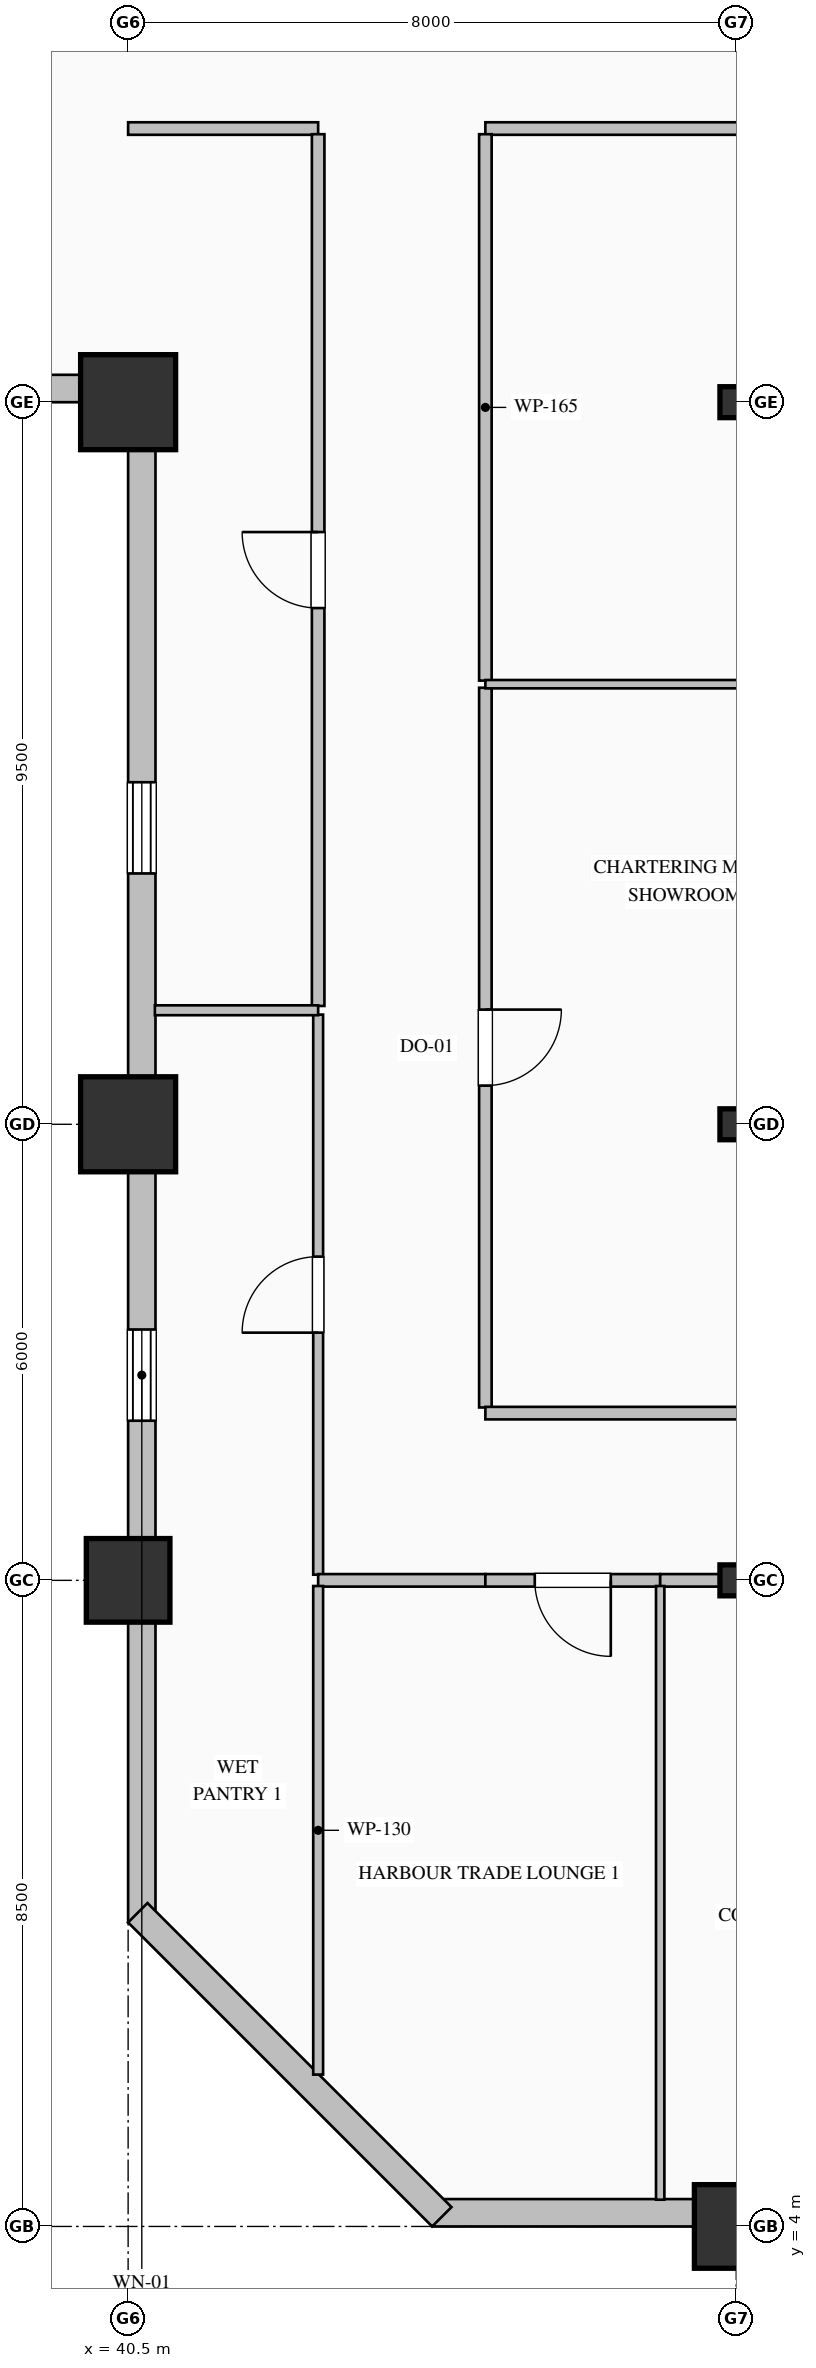
"""IFC4 building model, lengths in metres.
Left out: names, types, materials, properties, quantities, classifications, styles, units other than length and angle.
Written with IfcOpenShell. Run it as: python <this file> out.ifc"""

import sys

from ifc_helpers import new_model, si_unit, direction, frame, frame_2d, origin, origin_2d, place, context, subcontext, project, spatial, rectangle, hollow_rectangle, i_section, extrude, element, fill, save


model = new_model("IFC4")
c1 = context("Model", 3, precision=1e-05, world=origin(), true_north=direction((0.0, 1.0)))
c2 = subcontext(c1, "Body", "Model", "MODEL_VIEW")
j1 = project(units=[si_unit("LENGTHUNIT", "METRE"), si_unit("PLANEANGLEUNIT", "RADIAN")], contexts=[c1])
p1 = place(None, origin())
s1 = spatial("IfcSite", under=j1, at=p1, CompositionType="ELEMENT")
p2 = place(p1, origin())
s2 = spatial("IfcBuilding", under=s1, at=p2, CompositionType="ELEMENT")
p3 = place(p2, frame((0.0, 0.0, 96.2)))
s3 = spatial("IfcBuildingStorey", under=s2, at=p3, CompositionType="ELEMENT", Elevation=96.2)
p4 = place(p3, frame((40.5, 12.5, 0.0), z_axis=(0.0, 0.0, 1.0), x_axis=(1.0, 0.0, 0.0)))
e1 = element("IfcColumn", 1, at=p4, inside=s3, PredefinedType="COLUMN", context=c2, shape_type="SweptSolid", body=[
    extrude(hollow_rectangle(XDim=1.1, YDim=1.1, WallThickness=0.04, at=origin_2d()), origin(), (0.0, 0.0, 1.0), 4.0),
])
for number, where, z_axis, x_axis in (
    (2, (40.5, 18.5, 0.0), (0.0, 0.0, 1.0), (1.0, 0.0, 0.0)),
    (3, (40.5, 28.0, 0.0), (0.0, 0.0, 1.0), (1.0, 0.0, 0.0)),
):
    element("IfcColumn", number, at=place(p3, frame(where, z_axis=z_axis, x_axis=x_axis)), inside=s3, PredefinedType="COLUMN", context=c2, shape_type="SweptSolid", body=[
        extrude(hollow_rectangle(XDim=1.25, YDim=1.25, WallThickness=0.045, at=origin_2d()), origin(), (0.0, 0.0, 1.0), 4.0),
    ])
p5 = place(p3, frame((48.5, 4.0, 0.0), z_axis=(0.0, 0.0, 1.0), x_axis=(1.0, 0.0, 0.0)))
e4 = element("IfcColumn", 4, at=p5, inside=s3, PredefinedType="COLUMN", context=c2, shape_type="SweptSolid", body=[
    extrude(hollow_rectangle(XDim=1.1, YDim=1.1, WallThickness=0.04, at=origin_2d()), origin(), (0.0, 0.0, 1.0), 4.0),
])
for number, where, z_axis, x_axis in (
    (5, (48.5, 12.5, 0.0), (0.0, 0.0, 1.0), (1.0, 0.0, 0.0)),
    (6, (48.5, 18.5, 0.0), (0.0, 0.0, 1.0), (1.0, 0.0, 0.0)),
    (7, (48.5, 28.0, 0.0), (0.0, 0.0, 1.0), (1.0, 0.0, 0.0)),
):
    element("IfcColumn", number, at=place(p3, frame(where, z_axis=z_axis, x_axis=x_axis)), inside=s3, PredefinedType="COLUMN", context=c2, shape_type="SweptSolid", body=[
        extrude(i_section(OverallWidth=0.407, OverallDepth=0.428, WebThickness=0.02, FlangeThickness=0.035, FilletRadius=0.022, at=origin_2d()), origin(), (0.0, 0.0, 1.0), 4.0),
    ])
p6 = place(p3, frame((40.68, 8.0, 0.0), z_axis=(0.0, 0.0, 1.0), x_axis=(0.0, 1.0, 0.0)))
e8 = element("IfcWall", 8, at=p6, inside=s3, PredefinedType="SOLIDWALL", context=c2, shape_type="SweptSolid", body=[
    extrude(rectangle(XDim=20.36, YDim=0.36, at=frame_2d((10.18, 0.0))), origin(), (0.0, 0.0, 1.0), 3.05),
])
p7 = place(p6, frame((6.6, 0.0, 0.7)))
e9 = element("IfcOpeningElement", 9, at=p7, cuts=e8, PredefinedType="OPENING", context=c2, shape_type="SweptSolid", body=[
    extrude(rectangle(XDim=1.2, YDim=1.85, at=frame_2d((0.6, 0.925))), frame((0.0, 0.19, 0.0), z_axis=(0.0, -1.0, 0.0), x_axis=(1.0, 0.0, 0.0)), (0.0, 0.0, 1.0), 0.38),
])
p8 = place(p6, frame((13.8, 0.0, 0.7)))
e10 = element("IfcOpeningElement", 10, at=p8, cuts=e8, PredefinedType="OPENING", context=c2, shape_type="SweptSolid", body=[
    extrude(rectangle(XDim=1.2, YDim=1.85, at=frame_2d((0.6, 0.925))), frame((0.0, 0.19, 0.0), z_axis=(0.0, -1.0, 0.0), x_axis=(1.0, 0.0, 0.0)), (0.0, 0.0, 1.0), 0.38),
])
p9 = place(p3, frame((40.52, 28.18, 0.0), z_axis=(0.0, 0.0, 1.0), x_axis=(-1.0, 0.0, 0.0)))
e11 = element("IfcWall", 11, at=p9, inside=s3, PredefinedType="SOLIDWALL", context=c2, shape_type="SweptSolid", body=[
    extrude(rectangle(XDim=36.52, YDim=0.36, at=frame_2d((18.26, 0.0))), origin(), (0.0, 0.0, 1.0), 3.05),
])
p10 = place(p9, frame((13.8, 0.0, 0.7)))
e12 = element("IfcOpeningElement", 12, at=p10, cuts=e11, PredefinedType="OPENING", context=c2, shape_type="SweptSolid", body=[
    extrude(rectangle(XDim=1.2, YDim=1.85, at=frame_2d((0.6, 0.925))), frame((0.0, 0.19, 0.0), z_axis=(0.0, -1.0, 0.0), x_axis=(1.0, 0.0, 0.0)), (0.0, 0.0, 1.0), 0.38),
])
p11 = place(p9, frame((21.0, 0.0, 0.7)))
e13 = element("IfcOpeningElement", 13, at=p11, cuts=e11, PredefinedType="OPENING", context=c2, shape_type="SweptSolid", body=[
    extrude(rectangle(XDim=1.2, YDim=1.85, at=frame_2d((0.6, 0.925))), frame((0.0, 0.19, 0.0), z_axis=(0.0, -1.0, 0.0), x_axis=(1.0, 0.0, 0.0)), (0.0, 0.0, 1.0), 0.38),
])
p12 = place(p3, frame((60.0, 4.18, 0.0), z_axis=(0.0, 0.0, 1.0), x_axis=(-1.0, 0.0, 0.0)))
e14 = element("IfcWall", 14, at=p12, inside=s3, PredefinedType="SOLIDWALL", context=c2, shape_type="SweptSolid", body=[
    extrude(rectangle(XDim=15.5, YDim=0.36, at=frame_2d((7.75, 0.0))), origin(), (0.0, 0.0, 1.0), 3.25),
])
p13 = place(p3, frame((44.627, 4.127, 0.0), z_axis=(0.0, 0.0, 1.0), x_axis=(-0.707106781187, 0.707106781187, 0.0)))
e15 = element("IfcWall", 15, at=p13, inside=s3, PredefinedType="SOLIDWALL", context=c2, shape_type="SweptSolid", body=[
    extrude(rectangle(XDim=5.657, YDim=0.36, at=frame_2d((2.828, 0.0))), origin(), (0.0, 0.0, 1.0), 3.75),
])
p14 = place(p3, frame((56.5, 31.6, 0.0), z_axis=(0.0, 0.0, 1.0), x_axis=(-1.0, 0.0, 0.0)))
e16 = element("IfcWall", 16, at=p14, inside=s3, PredefinedType="PARTITIONING", context=c2, shape_type="SweptSolid", body=[
    extrude(rectangle(XDim=11.3, YDim=0.165, at=frame_2d((5.65, 0.0))), origin(), (0.0, 0.0, 1.0), 3.75),
])
p15 = place(p14, frame((5.15, 0.0, 0.0)))
e17 = element("IfcOpeningElement", 17, at=p15, cuts=e16, PredefinedType="OPENING", context=c2, shape_type="SweptSolid", body=[
    extrude(rectangle(XDim=1.0, YDim=2.15, at=frame_2d((0.5, 1.075))), frame((0.0, 0.093, 0.0), z_axis=(0.0, -1.0, 0.0), x_axis=(1.0, 0.0, 0.0)), (0.0, 0.0, 1.0), 0.185),
])
p16 = place(p3, frame((43.0, 31.6, 0.0), z_axis=(0.0, 0.0, 1.0), x_axis=(-1.0, 0.0, 0.0)))
e18 = element("IfcWall", 18, at=p16, inside=s3, PredefinedType="PARTITIONING", context=c2, shape_type="SweptSolid", body=[
    extrude(rectangle(XDim=2.5, YDim=0.165, at=frame_2d((1.25, 0.0))), origin(), (0.0, 0.0, 1.0), 3.75),
])
p17 = place(p3, frame((45.2, 31.525, 0.0), z_axis=(0.0, 0.0, 1.0), x_axis=(0.0, -1.0, 0.0)))
e19 = element("IfcWall", 19, at=p17, inside=s3, PredefinedType="PARTITIONING", context=c2, shape_type="SweptSolid", body=[
    extrude(rectangle(XDim=7.188, YDim=0.165, at=frame_2d((3.594, 0.0))), origin(), (0.0, 0.0, 1.0), 3.75),
])
p18 = place(p3, frame((45.2, 24.243, 0.0), z_axis=(0.0, 0.0, 1.0), x_axis=(0.0, -1.0, 0.0)))
e20 = element("IfcWall", 20, at=p18, inside=s3, PredefinedType="PARTITIONING", context=c2, shape_type="SweptSolid", body=[
    extrude(rectangle(XDim=9.469, YDim=0.165, at=frame_2d((4.734, 0.0))), origin(), (0.0, 0.0, 1.0), 3.75),
])
p19 = place(p18, frame((4.234, 0.0, 0.0)))
e21 = element("IfcOpeningElement", 21, at=p19, cuts=e20, PredefinedType="OPENING", context=c2, shape_type="SweptSolid", body=[
    extrude(rectangle(XDim=1.0, YDim=2.15, at=frame_2d((0.5, 1.075))), frame((0.0, 0.093, 0.0), z_axis=(0.0, -1.0, 0.0), x_axis=(1.0, 0.0, 0.0)), (0.0, 0.0, 1.0), 0.185),
])
p20 = place(p3, frame((43.0, 12.574, 0.0), z_axis=(0.0, 0.0, 1.0), x_axis=(0.0, 1.0, 0.0)))
e22 = element("IfcWall", 22, at=p20, inside=s3, PredefinedType="PARTITIONING", context=c2, shape_type="SweptSolid", body=[
    extrude(rectangle(XDim=7.369, YDim=0.13, at=frame_2d((3.684, 0.0))), origin(), (0.0, 0.0, 1.0), 3.75),
])
p21 = place(p20, frame((3.184, 0.0, 0.0)))
e23 = element("IfcOpeningElement", 23, at=p21, cuts=e22, PredefinedType="OPENING", context=c2, shape_type="SweptSolid", body=[
    extrude(rectangle(XDim=1.0, YDim=2.15, at=frame_2d((0.5, 1.075))), frame((0.0, 0.075, 0.0), z_axis=(0.0, -1.0, 0.0), x_axis=(1.0, 0.0, 0.0)), (0.0, 0.0, 1.0), 0.15),
])
p22 = place(p3, frame((43.0, 20.057, 0.0), z_axis=(0.0, 0.0, 1.0), x_axis=(0.0, 1.0, 0.0)))
e24 = element("IfcWall", 24, at=p22, inside=s3, PredefinedType="PARTITIONING", context=c2, shape_type="SweptSolid", body=[
    extrude(rectangle(XDim=11.469, YDim=0.165, at=frame_2d((5.734, 0.0))), origin(), (0.0, 0.0, 1.0), 3.75),
])
p23 = place(p22, frame((5.234, 0.0, 0.0)))
e25 = element("IfcOpeningElement", 25, at=p23, cuts=e24, PredefinedType="OPENING", context=c2, shape_type="SweptSolid", body=[
    extrude(rectangle(XDim=1.0, YDim=2.15, at=frame_2d((0.5, 1.075))), frame((0.0, 0.093, 0.0), z_axis=(0.0, -1.0, 0.0), x_axis=(1.0, 0.0, 0.0)), (0.0, 0.0, 1.0), 0.185),
])
p24 = place(p3, frame((45.2, 12.5, 0.0), z_axis=(0.0, 0.0, 1.0), x_axis=(-1.0, 0.0, 0.0)))
e26 = element("IfcWall", 26, at=p24, inside=s3, PredefinedType="PARTITIONING", context=c2, shape_type="SweptSolid", body=[
    extrude(rectangle(XDim=2.2, YDim=0.165, at=frame_2d((1.1, 0.0))), origin(), (0.0, 0.0, 1.0), 3.042),
])
p25 = place(p3, frame((45.2, 14.7, 0.0), z_axis=(0.0, 0.0, 1.0), x_axis=(1.0, 0.0, 0.0)))
e27 = element("IfcWall", 27, at=p25, inside=s3, PredefinedType="PARTITIONING", context=c2, shape_type="SweptSolid", body=[
    extrude(rectangle(XDim=5.3, YDim=0.165, at=frame_2d((2.65, 0.0))), origin(), (0.0, 0.0, 1.0), 3.75),
])
p26 = place(p3, frame((47.5, 12.5, 0.0), z_axis=(0.0, 0.0, 1.0), x_axis=(-1.0, 0.0, 0.0)))
e28 = element("IfcWall", 28, at=p26, inside=s3, PredefinedType="PARTITIONING", context=c2, shape_type="SweptSolid", body=[
    extrude(rectangle(XDim=2.3, YDim=0.165, at=frame_2d((1.15, 0.0))), origin(), (0.0, 0.0, 1.0), 3.042),
])
p27 = place(p26, frame((0.65, 0.0, 0.0)))
e29 = element("IfcOpeningElement", 29, at=p27, cuts=e28, PredefinedType="OPENING", context=c2, shape_type="SweptSolid", body=[
    extrude(rectangle(XDim=1.0, YDim=2.15, at=frame_2d((0.5, 1.075))), frame((0.0, 0.093, 0.0), z_axis=(0.0, -1.0, 0.0), x_axis=(1.0, 0.0, 0.0)), (0.0, 0.0, 1.0), 0.185),
])
p28 = place(p3, frame((52.5, 12.5, 0.0), z_axis=(0.0, 0.0, 1.0), x_axis=(-1.0, 0.0, 0.0)))
e30 = element("IfcWall", 30, at=p28, inside=s3, PredefinedType="PARTITIONING", context=c2, shape_type="SweptSolid", body=[
    extrude(rectangle(XDim=5.0, YDim=0.165, at=frame_2d((2.5, 0.0))), origin(), (0.0, 0.0, 1.0), 3.042),
])
p29 = place(p28, frame((1.95, 0.0, 0.0)))
e31 = element("IfcOpeningElement", 31, at=p29, cuts=e30, PredefinedType="OPENING", context=c2, shape_type="SweptSolid", body=[
    extrude(rectangle(XDim=1.1, YDim=2.2, at=frame_2d((0.55, 1.1))), frame((0.0, 0.093, 0.0), z_axis=(0.0, -1.0, 0.0), x_axis=(1.0, 0.0, 0.0)), (0.0, 0.0, 1.0), 0.185),
])
p30 = place(p3, frame((50.5, 24.29, 0.0), z_axis=(0.0, 0.0, 1.0), x_axis=(-1.0, 0.0, 0.0)))
e32 = element("IfcWall", 32, at=p30, inside=s3, PredefinedType="MOVABLE", context=c2, shape_type="SweptSolid", body=[
    extrude(rectangle(XDim=5.3, YDim=0.11, at=frame_2d((2.65, 0.0))), origin(), (0.0, 0.0, 1.0), 3.75),
])
p31 = place(p3, frame((40.852, 20.0, 0.0), z_axis=(0.0, 0.0, 1.0), x_axis=(1.0, 0.0, 0.0)))
e33 = element("IfcWall", 33, at=p31, inside=s3, PredefinedType="PARTITIONING", context=c2, shape_type="SweptSolid", body=[
    extrude(rectangle(XDim=2.148, YDim=0.13, at=frame_2d((1.074, 0.0))), origin(), (0.0, 0.0, 1.0), 3.75),
])
p32 = place(p3, frame((43.0, 12.426, 0.0), z_axis=(0.0, 0.0, 1.0), x_axis=(0.0, -1.0, 0.0)))
e34 = element("IfcWall", 34, at=p32, inside=s3, PredefinedType="PARTITIONING", context=c2, shape_type="SweptSolid", body=[
    extrude(rectangle(XDim=6.428, YDim=0.13, at=frame_2d((3.214, 0.0))), origin(), (0.0, 0.0, 1.0), 3.75),
])
p33 = place(p3, frame((47.5, 12.426, 0.0), z_axis=(0.0, 0.0, 1.0), x_axis=(0.0, -1.0, 0.0)))
e35 = element("IfcWall", 35, at=p33, inside=s3, PredefinedType="MOVABLE", context=c2, shape_type="SweptSolid", body=[
    extrude(rectangle(XDim=8.073, YDim=0.11, at=frame_2d((4.037, 0.0))), origin(), (0.0, 0.0, 1.0), 3.75),
])
p34 = place(p7, origin())
e36 = element("IfcWindow", 36, at=p34, inside=s3, PartitioningType="DOUBLE_PANEL_VERTICAL", PredefinedType="WINDOW", context=c2, shape_type="SweptSolid", body=[
    extrude(rectangle(XDim=1.2, YDim=1.85, at=frame_2d((0.6, 0.925))), frame((0.0, 0.15, 0.0), z_axis=(0.0, -1.0, 0.0), x_axis=(1.0, 0.0, 0.0)), (0.0, 0.0, 1.0), 0.06),
])
fill(e9, e36)
p35 = place(p8, origin())
e37 = element("IfcWindow", 37, at=p35, inside=s3, PartitioningType="DOUBLE_PANEL_VERTICAL", PredefinedType="WINDOW", context=c2, shape_type="SweptSolid", body=[
    extrude(rectangle(XDim=1.2, YDim=1.85, at=frame_2d((0.6, 0.925))), frame((0.0, 0.15, 0.0), z_axis=(0.0, -1.0, 0.0), x_axis=(1.0, 0.0, 0.0)), (0.0, 0.0, 1.0), 0.06),
])
fill(e10, e37)
p36 = place(p19, origin())
e38 = element("IfcDoor", 38, at=p36, inside=s3, OperationType="SINGLE_SWING_LEFT", PredefinedType="DOOR", context=c2, shape_type="SweptSolid", body=[
    extrude(rectangle(XDim=1.0, YDim=2.15, at=frame_2d((0.5, 1.075))), frame((0.0, 0.025, 0.0), z_axis=(0.0, -1.0, 0.0), x_axis=(1.0, 0.0, 0.0)), (0.0, 0.0, 1.0), 0.05),
])
fill(e21, e38)
p37 = place(p21, origin())
e39 = element("IfcDoor", 39, at=p37, inside=s3, OperationType="SINGLE_SWING_LEFT", PredefinedType="DOOR", context=c2, shape_type="SweptSolid", body=[
    extrude(rectangle(XDim=1.0, YDim=2.15, at=frame_2d((0.5, 1.075))), frame((0.0, 0.025, 0.0), z_axis=(0.0, -1.0, 0.0), x_axis=(1.0, 0.0, 0.0)), (0.0, 0.0, 1.0), 0.05),
])
fill(e23, e39)
p38 = place(p23, origin())
e40 = element("IfcDoor", 40, at=p38, inside=s3, OperationType="SINGLE_SWING_RIGHT", PredefinedType="DOOR", context=c2, shape_type="SweptSolid", body=[
    extrude(rectangle(XDim=1.0, YDim=2.15, at=frame_2d((0.5, 1.075))), frame((0.0, 0.025, 0.0), z_axis=(0.0, -1.0, 0.0), x_axis=(1.0, 0.0, 0.0)), (0.0, 0.0, 1.0), 0.05),
])
fill(e25, e40)
p39 = place(p27, origin())
e41 = element("IfcDoor", 41, at=p39, inside=s3, OperationType="SINGLE_SWING_LEFT", PredefinedType="DOOR", context=c2, shape_type="SweptSolid", body=[
    extrude(rectangle(XDim=1.0, YDim=2.15, at=frame_2d((0.5, 1.075))), frame((0.0, 0.025, 0.0), z_axis=(0.0, -1.0, 0.0), x_axis=(1.0, 0.0, 0.0)), (0.0, 0.0, 1.0), 0.05),
])
fill(e29, e41)
save(model, sys.argv[1])
